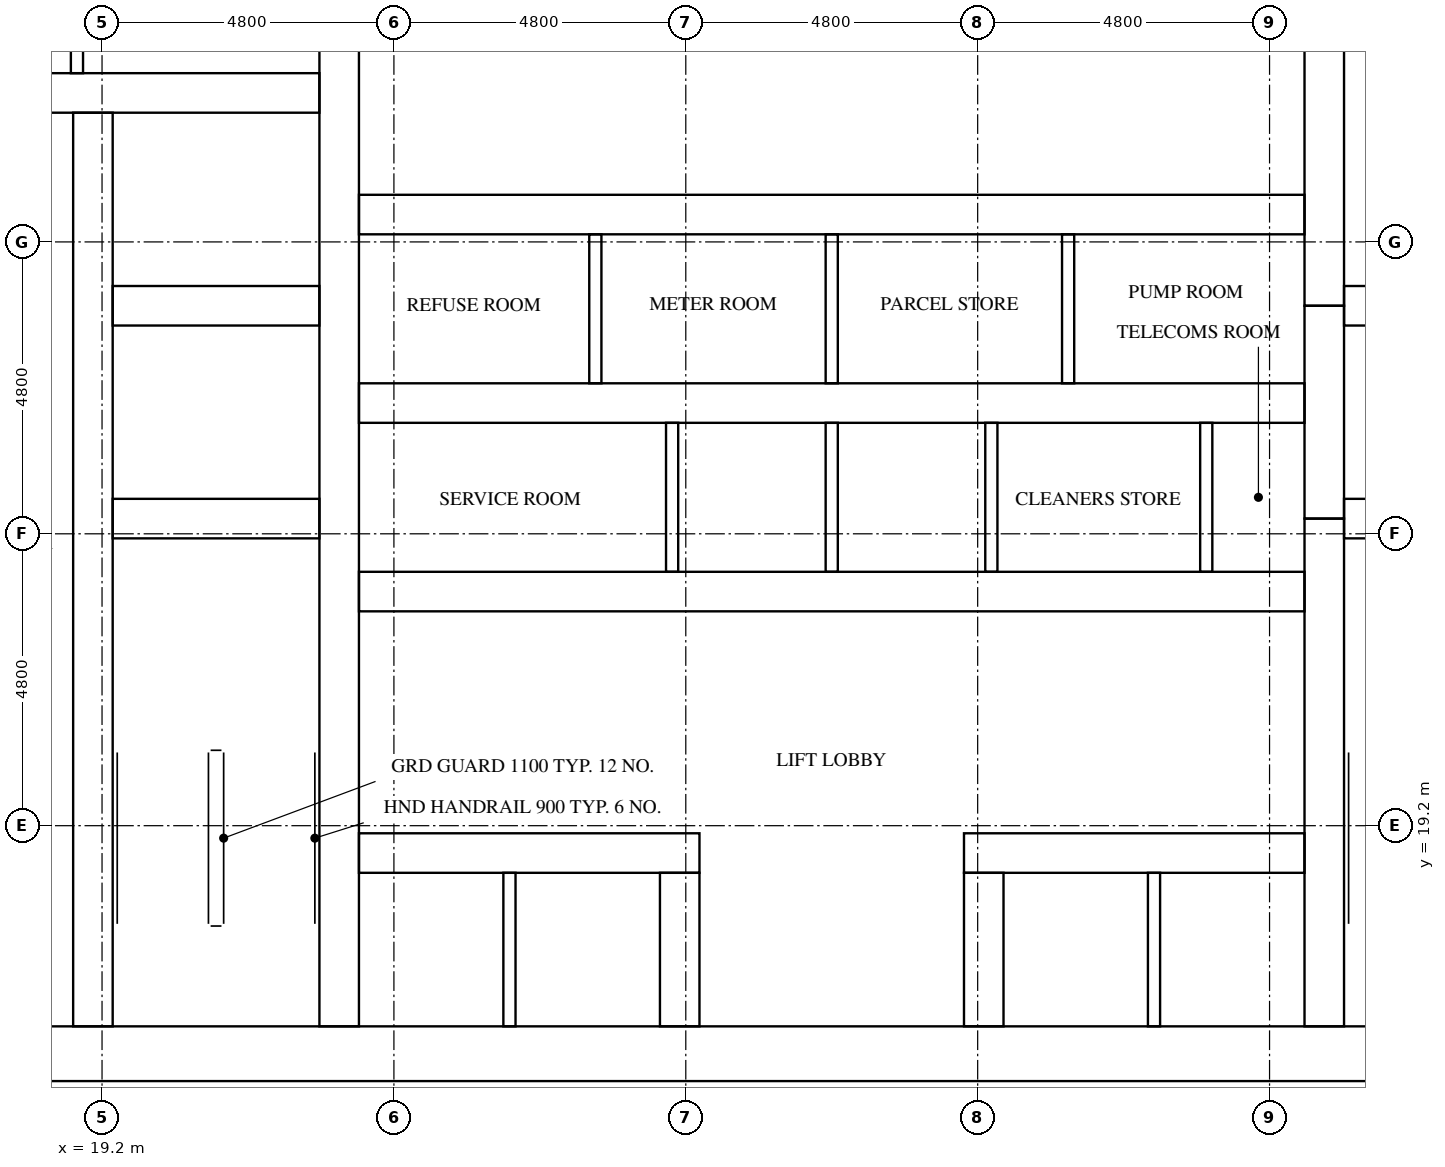
"""IFC4 building model, lengths in metres.
Left out: names, types, materials, properties, quantities, classifications, styles, units other than length and angle.
Written with IfcOpenShell. Run it as: python <this file> out.ifc"""

import sys

from ifc_helpers import new_model, si_unit, direction, frame, frame_2d, origin, place, context, subcontext, project, spatial, rectangle, extrude, element, fill, save


model = new_model("IFC4")
c1 = context("Model", 3, precision=1e-05, world=origin(), true_north=direction((0.0, 1.0)))
c2 = subcontext(c1, "Body", "Model", "MODEL_VIEW")
j1 = project(units=[si_unit("LENGTHUNIT", "METRE"), si_unit("PLANEANGLEUNIT", "RADIAN")], contexts=[c1])
p1 = place(None, origin())
s1 = spatial("IfcSite", under=j1, at=p1, CompositionType="ELEMENT")
p2 = place(p1, origin())
s2 = spatial("IfcBuilding", under=s1, at=p2, CompositionType="ELEMENT")
p3 = place(p2, frame((0.0, 0.0, 92.7)))
s3 = spatial("IfcBuildingStorey", under=s2, at=p3, CompositionType="ELEMENT", Elevation=92.7)
p4 = place(p3, frame((15.0, 15.45, 0.0), z_axis=(0.0, 0.0, 1.0), x_axis=(1.0, 0.0, 0.0)))
e1 = element("IfcWall", 1, at=p4, inside=s3, PredefinedType="SHEAR", context=c2, shape_type="SweptSolid", body=[
    extrude(rectangle(XDim=32.4, YDim=0.9, at=frame_2d((16.2, 0.0))), origin(), (0.0, 0.0, 1.0), 3.2),
])
p5 = place(p4, frame((15.3, 0.0, 0.0)))
e2 = element("IfcOpeningElement", 2, at=p5, cuts=e1, PredefinedType="OPENING", context=c2, shape_type="SweptSolid", body=[
    extrude(rectangle(XDim=1.8, YDim=2.1, at=frame_2d((0.9, 1.05))), frame((0.0, 0.46, 0.0), z_axis=(0.0, -1.0, 0.0), x_axis=(1.0, 0.0, 0.0)), (0.0, 0.0, 1.0), 0.92),
])
p6 = place(p3, frame((19.05, 15.9, 0.0), z_axis=(0.0, 0.0, 1.0), x_axis=(0.0, 1.0, 0.0)))
e3 = element("IfcWall", 3, at=p6, inside=s3, PredefinedType="SHEAR", context=c2, shape_type="SweptSolid", body=[
    extrude(rectangle(XDim=15.025, YDim=0.65, at=frame_2d((7.513, 0.0))), origin(), (0.0, 0.0, 1.0), 3.2),
])
p7 = place(p6, frame((9.55, 0.0, 0.0)))
e4 = element("IfcOpeningElement", 4, at=p7, cuts=e3, PredefinedType="OPENING", context=c2, shape_type="SweptSolid", body=[
    extrude(rectangle(XDim=1.1, YDim=2.1, at=frame_2d((0.55, 1.05))), frame((0.0, 0.335, 0.0), z_axis=(0.0, -1.0, 0.0), x_axis=(1.0, 0.0, 0.0)), (0.0, 0.0, 1.0), 0.67),
])
p8 = place(p6, frame((13.05, 0.0, 0.0)))
e5 = element("IfcOpeningElement", 5, at=p8, cuts=e3, PredefinedType="OPENING", context=c2, shape_type="SweptSolid", body=[
    extrude(rectangle(XDim=1.1, YDim=2.1, at=frame_2d((0.55, 1.05))), frame((0.0, 0.335, 0.0), z_axis=(0.0, -1.0, 0.0), x_axis=(1.0, 0.0, 0.0)), (0.0, 0.0, 1.0), 0.67),
])
p9 = place(p6, frame((0.3, 0.0, 0.0)))
e6 = element("IfcOpeningElement", 6, at=p9, cuts=e3, PredefinedType="OPENING", context=c2, shape_type="SweptSolid", body=[
    extrude(rectangle(XDim=1.2, YDim=2.1, at=frame_2d((0.6, 1.05))), frame((0.0, 0.335, 0.0), z_axis=(0.0, -1.0, 0.0), x_axis=(1.0, 0.0, 0.0)), (0.0, 0.0, 1.0), 0.67),
])
p10 = place(p3, frame((23.1, 15.9, 0.0), z_axis=(0.0, 0.0, 1.0), x_axis=(0.0, 1.0, 0.0)))
e7 = element("IfcWall", 7, at=p10, inside=s3, PredefinedType="SHEAR", context=c2, shape_type="SweptSolid", body=[
    extrude(rectangle(XDim=21.0, YDim=0.65, at=frame_2d((10.5, 0.0))), origin(), (0.0, 0.0, 1.0), 3.2),
])
p11 = place(p3, frame((39.3, 15.9, 0.0), z_axis=(0.0, 0.0, 1.0), x_axis=(0.0, 1.0, 0.0)))
e8 = element("IfcWall", 8, at=p11, inside=s3, PredefinedType="SHEAR", context=c2, shape_type="SweptSolid", body=[
    extrude(rectangle(XDim=8.35, YDim=0.65, at=frame_2d((4.175, 0.0))), origin(), (0.0, 0.0, 1.0), 3.2),
])
p12 = place(p3, frame((39.3, 24.25, 0.0), z_axis=(0.0, 0.0, 1.0), x_axis=(0.0, 1.0, 0.0)))
e9 = element("IfcWall", 9, at=p12, inside=s3, PredefinedType="SHEAR", context=c2, shape_type="SweptSolid", body=[
    extrude(rectangle(XDim=3.5, YDim=0.65, at=frame_2d((1.75, 0.0))), origin(), (0.0, 0.0, 1.0), 3.2),
])
p13 = place(p3, frame((39.3, 27.75, 0.0), z_axis=(0.0, 0.0, 1.0), x_axis=(0.0, 1.0, 0.0)))
e10 = element("IfcWall", 10, at=p13, inside=s3, PredefinedType="SHEAR", context=c2, shape_type="SweptSolid", body=[
    extrude(rectangle(XDim=9.15, YDim=0.65, at=frame_2d((4.575, 0.0))), origin(), (0.0, 0.0, 1.0), 3.2),
])
for number, where, z_axis, x_axis in (
    (11, (19.375, 24.25, 0.0), (0.0, 0.0, 1.0), (1.0, 0.0, 0.0)),
    (12, (19.375, 27.75, 0.0), (0.0, 0.0, 1.0), (1.0, 0.0, 0.0)),
):
    element("IfcWall", number, at=place(p3, frame(where, z_axis=z_axis, x_axis=x_axis)), inside=s3, PredefinedType="SHEAR", context=c2, shape_type="SweptSolid", body=[
        extrude(rectangle(XDim=3.4, YDim=0.65, at=frame_2d((1.7, 0.0))), origin(), (0.0, 0.0, 1.0), 3.2),
    ])
p14 = place(p3, frame((15.9, 31.25, 0.0), z_axis=(0.0, 0.0, 1.0), x_axis=(1.0, 0.0, 0.0)))
e13 = element("IfcWall", 13, at=p14, inside=s3, PredefinedType="SHEAR", context=c2, shape_type="SweptSolid", body=[
    extrude(rectangle(XDim=6.875, YDim=0.65, at=frame_2d((3.438, 0.0))), origin(), (0.0, 0.0, 1.0), 3.2),
])
for number, where, z_axis, x_axis in (
    (14, (39.625, 24.25, 0.0), (0.0, 0.0, 1.0), (1.0, 0.0, 0.0)),
    (15, (39.625, 27.75, 0.0), (0.0, 0.0, 1.0), (1.0, 0.0, 0.0)),
):
    element("IfcWall", number, at=place(p3, frame(where, z_axis=z_axis, x_axis=x_axis)), inside=s3, PredefinedType="SHEAR", context=c2, shape_type="SweptSolid", body=[
        extrude(rectangle(XDim=3.4, YDim=0.65, at=frame_2d((1.7, 0.0))), origin(), (0.0, 0.0, 1.0), 3.2),
    ])
p15 = place(p3, frame((23.425, 18.75, 0.0), z_axis=(0.0, 0.0, 1.0), x_axis=(1.0, 0.0, 0.0)))
e16 = element("IfcWall", 16, at=p15, inside=s3, PredefinedType="SHEAR", context=c2, shape_type="SweptSolid", body=[
    extrude(rectangle(XDim=5.6, YDim=0.65, at=frame_2d((2.8, 0.0))), origin(), (0.0, 0.0, 1.0), 3.2),
])
p16 = place(p15, frame((0.637, 0.0, 0.0)))
e17 = element("IfcOpeningElement", 17, at=p16, cuts=e16, PredefinedType="OPENING", context=c2, shape_type="SweptSolid", body=[
    extrude(rectangle(XDim=1.1, YDim=2.1, at=frame_2d((0.55, 1.05))), frame((0.0, 0.335, 0.0), z_axis=(0.0, -1.0, 0.0), x_axis=(1.0, 0.0, 0.0)), (0.0, 0.0, 1.0), 0.67),
])
p17 = place(p15, frame((3.212, 0.0, 0.0)))
e18 = element("IfcOpeningElement", 18, at=p17, cuts=e16, PredefinedType="OPENING", context=c2, shape_type="SweptSolid", body=[
    extrude(rectangle(XDim=1.1, YDim=2.1, at=frame_2d((0.55, 1.05))), frame((0.0, 0.335, 0.0), z_axis=(0.0, -1.0, 0.0), x_axis=(1.0, 0.0, 0.0)), (0.0, 0.0, 1.0), 0.67),
])
p18 = place(p3, frame((33.375, 18.75, 0.0), z_axis=(0.0, 0.0, 1.0), x_axis=(1.0, 0.0, 0.0)))
e19 = element("IfcWall", 19, at=p18, inside=s3, PredefinedType="SHEAR", context=c2, shape_type="SweptSolid", body=[
    extrude(rectangle(XDim=5.6, YDim=0.65, at=frame_2d((2.8, 0.0))), origin(), (0.0, 0.0, 1.0), 3.2),
])
p19 = place(p18, frame((1.288, 0.0, 0.0)))
e20 = element("IfcOpeningElement", 20, at=p19, cuts=e19, PredefinedType="OPENING", context=c2, shape_type="SweptSolid", body=[
    extrude(rectangle(XDim=1.1, YDim=2.1, at=frame_2d((0.55, 1.05))), frame((0.0, 0.335, 0.0), z_axis=(0.0, -1.0, 0.0), x_axis=(1.0, 0.0, 0.0)), (0.0, 0.0, 1.0), 0.67),
])
p20 = place(p18, frame((3.863, 0.0, 0.0)))
e21 = element("IfcOpeningElement", 21, at=p20, cuts=e19, PredefinedType="OPENING", context=c2, shape_type="SweptSolid", body=[
    extrude(rectangle(XDim=1.1, YDim=2.1, at=frame_2d((0.55, 1.05))), frame((0.0, 0.335, 0.0), z_axis=(0.0, -1.0, 0.0), x_axis=(1.0, 0.0, 0.0)), (0.0, 0.0, 1.0), 0.67),
])
p21 = place(p3, frame((23.425, 23.05, 0.0), z_axis=(0.0, 0.0, 1.0), x_axis=(1.0, 0.0, 0.0)))
e22 = element("IfcWall", 22, at=p21, inside=s3, PredefinedType="SHEAR", context=c2, shape_type="SweptSolid", body=[
    extrude(rectangle(XDim=15.55, YDim=0.65, at=frame_2d((7.775, 0.0))), origin(), (0.0, 0.0, 1.0), 3.2),
])
p22 = place(p21, frame((2.025, 0.0, 0.0)))
e23 = element("IfcOpeningElement", 23, at=p22, cuts=e22, PredefinedType="OPENING", context=c2, shape_type="SweptSolid", body=[
    extrude(rectangle(XDim=1.0, YDim=2.1, at=frame_2d((0.5, 1.05))), frame((0.0, 0.335, 0.0), z_axis=(0.0, -1.0, 0.0), x_axis=(1.0, 0.0, 0.0)), (0.0, 0.0, 1.0), 0.67),
])
p23 = place(p21, frame((11.667, 0.0, 0.0)))
e24 = element("IfcOpeningElement", 24, at=p23, cuts=e22, PredefinedType="OPENING", context=c2, shape_type="SweptSolid", body=[
    extrude(rectangle(XDim=1.0, YDim=2.1, at=frame_2d((0.5, 1.05))), frame((0.0, 0.335, 0.0), z_axis=(0.0, -1.0, 0.0), x_axis=(1.0, 0.0, 0.0)), (0.0, 0.0, 1.0), 0.67),
])
p24 = place(p21, frame((14.292, 0.0, 0.0)))
e25 = element("IfcOpeningElement", 25, at=p24, cuts=e22, PredefinedType="OPENING", context=c2, shape_type="SweptSolid", body=[
    extrude(rectangle(XDim=1.0, YDim=2.1, at=frame_2d((0.5, 1.05))), frame((0.0, 0.335, 0.0), z_axis=(0.0, -1.0, 0.0), x_axis=(1.0, 0.0, 0.0)), (0.0, 0.0, 1.0), 0.67),
])
p25 = place(p3, frame((23.425, 26.15, 0.0), z_axis=(0.0, 0.0, 1.0), x_axis=(1.0, 0.0, 0.0)))
e26 = element("IfcWall", 26, at=p25, inside=s3, PredefinedType="SHEAR", context=c2, shape_type="SweptSolid", body=[
    extrude(rectangle(XDim=15.55, YDim=0.65, at=frame_2d((7.775, 0.0))), origin(), (0.0, 0.0, 1.0), 3.2),
])
p26 = place(p3, frame((23.425, 29.25, 0.0), z_axis=(0.0, 0.0, 1.0), x_axis=(1.0, 0.0, 0.0)))
e27 = element("IfcWall", 27, at=p26, inside=s3, PredefinedType="SHEAR", context=c2, shape_type="SweptSolid", body=[
    extrude(rectangle(XDim=15.55, YDim=0.65, at=frame_2d((7.775, 0.0))), origin(), (0.0, 0.0, 1.0), 3.2),
])
p27 = place(p26, frame((1.394, 0.0, 0.0)))
e28 = element("IfcOpeningElement", 28, at=p27, cuts=e27, PredefinedType="OPENING", context=c2, shape_type="SweptSolid", body=[
    extrude(rectangle(XDim=1.0, YDim=2.1, at=frame_2d((0.5, 1.05))), frame((0.0, 0.335, 0.0), z_axis=(0.0, -1.0, 0.0), x_axis=(1.0, 0.0, 0.0)), (0.0, 0.0, 1.0), 0.67),
])
p28 = place(p26, frame((5.331, 0.0, 0.0)))
e29 = element("IfcOpeningElement", 29, at=p28, cuts=e27, PredefinedType="OPENING", context=c2, shape_type="SweptSolid", body=[
    extrude(rectangle(XDim=1.0, YDim=2.1, at=frame_2d((0.5, 1.05))), frame((0.0, 0.335, 0.0), z_axis=(0.0, -1.0, 0.0), x_axis=(1.0, 0.0, 0.0)), (0.0, 0.0, 1.0), 0.67),
])
p29 = place(p26, frame((9.219, 0.0, 0.0)))
e30 = element("IfcOpeningElement", 30, at=p29, cuts=e27, PredefinedType="OPENING", context=c2, shape_type="SweptSolid", body=[
    extrude(rectangle(XDim=1.0, YDim=2.1, at=frame_2d((0.5, 1.05))), frame((0.0, 0.335, 0.0), z_axis=(0.0, -1.0, 0.0), x_axis=(1.0, 0.0, 0.0)), (0.0, 0.0, 1.0), 0.67),
])
p30 = place(p26, frame((13.156, 0.0, 0.0)))
e31 = element("IfcOpeningElement", 31, at=p30, cuts=e27, PredefinedType="OPENING", context=c2, shape_type="SweptSolid", body=[
    extrude(rectangle(XDim=1.0, YDim=2.1, at=frame_2d((0.5, 1.05))), frame((0.0, 0.335, 0.0), z_axis=(0.0, -1.0, 0.0), x_axis=(1.0, 0.0, 0.0)), (0.0, 0.0, 1.0), 0.67),
])
for number, where, z_axis, x_axis in (
    (32, (28.7, 15.9, 0.0), (0.0, 0.0, 1.0), (0.0, 1.0, 0.0)),
    (33, (33.7, 15.9, 0.0), (0.0, 0.0, 1.0), (0.0, 1.0, 0.0)),
):
    element("IfcWall", number, at=place(p3, frame(where, z_axis=z_axis, x_axis=x_axis)), inside=s3, PredefinedType="SHEAR", context=c2, shape_type="SweptSolid", body=[
        extrude(rectangle(XDim=2.525, YDim=0.65, at=frame_2d((1.263, 0.0))), origin(), (0.0, 0.0, 1.0), 3.2),
    ])
for number, where, z_axis, x_axis in (
    (34, (28.575, 23.375, 0.0), (0.0, 0.0, 1.0), (0.0, 1.0, 0.0)),
    (35, (31.2, 23.375, 0.0), (0.0, 0.0, 1.0), (0.0, 1.0, 0.0)),
    (36, (33.825, 23.375, 0.0), (0.0, 0.0, 1.0), (0.0, 1.0, 0.0)),
):
    element("IfcWall", number, at=place(p3, frame(where, z_axis=z_axis, x_axis=x_axis)), inside=s3, PredefinedType="SOLIDWALL", context=c2, shape_type="SweptSolid", body=[
        extrude(rectangle(XDim=2.45, YDim=0.2, at=frame_2d((1.225, 0.0))), origin(), (0.0, 0.0, 1.0), 3.2),
    ])
for number, where, z_axis, x_axis in (
    (37, (25.9, 15.9, 0.0), (0.0, 0.0, 1.0), (0.0, 1.0, 0.0)),
    (38, (36.5, 15.9, 0.0), (0.0, 0.0, 1.0), (0.0, 1.0, 0.0)),
):
    element("IfcWall", number, at=place(p3, frame(where, z_axis=z_axis, x_axis=x_axis)), inside=s3, PredefinedType="SOLIDWALL", context=c2, shape_type="SweptSolid", body=[
        extrude(rectangle(XDim=2.525, YDim=0.2, at=frame_2d((1.263, 0.0))), origin(), (0.0, 0.0, 1.0), 3.2),
    ])
p31 = place(p3, frame((18.788, 31.575, 0.0), z_axis=(0.0, 0.0, 1.0), x_axis=(0.0, 1.0, 0.0)))
e39 = element("IfcWall", 39, at=p31, inside=s3, PredefinedType="PARTITIONING", context=c2, shape_type="SweptSolid", body=[
    extrude(rectangle(XDim=5.325, YDim=0.2, at=frame_2d((2.663, 0.0))), origin(), (0.0, 0.0, 1.0), 3.2),
])
for number, where, z_axis, x_axis in (
    (40, (37.359, 23.375, 0.0), (0.0, 0.0, 1.0), (0.0, 1.0, 0.0)),
    (41, (27.312, 26.475, 0.0), (0.0, 0.0, 1.0), (0.0, 1.0, 0.0)),
    (42, (31.2, 26.475, 0.0), (0.0, 0.0, 1.0), (0.0, 1.0, 0.0)),
    (43, (35.087, 26.475, 0.0), (0.0, 0.0, 1.0), (0.0, 1.0, 0.0)),
):
    element("IfcWall", number, at=place(p3, frame(where, z_axis=z_axis, x_axis=x_axis)), inside=s3, PredefinedType="PARTITIONING", context=c2, shape_type="SweptSolid", body=[
        extrude(rectangle(XDim=2.45, YDim=0.2, at=frame_2d((1.225, 0.0))), origin(), (0.0, 0.0, 1.0), 3.2),
    ])
p32 = place(p16, origin())
e44 = element("IfcDoor", 44, at=p32, inside=s3, OperationType="DOUBLE_DOOR_SLIDING", PredefinedType="DOOR", context=c2, shape_type="SweptSolid", body=[
    extrude(rectangle(XDim=1.1, YDim=2.1, at=frame_2d((0.55, 1.05))), frame((0.0, 0.025, 0.0), z_axis=(0.0, -1.0, 0.0), x_axis=(1.0, 0.0, 0.0)), (0.0, 0.0, 1.0), 0.05),
])
fill(e17, e44)
p33 = place(p17, origin())
e45 = element("IfcDoor", 45, at=p33, inside=s3, OperationType="DOUBLE_DOOR_SLIDING", PredefinedType="DOOR", context=c2, shape_type="SweptSolid", body=[
    extrude(rectangle(XDim=1.1, YDim=2.1, at=frame_2d((0.55, 1.05))), frame((0.0, 0.025, 0.0), z_axis=(0.0, -1.0, 0.0), x_axis=(1.0, 0.0, 0.0)), (0.0, 0.0, 1.0), 0.05),
])
fill(e18, e45)
p34 = place(p19, origin())
e46 = element("IfcDoor", 46, at=p34, inside=s3, OperationType="DOUBLE_DOOR_SLIDING", PredefinedType="DOOR", context=c2, shape_type="SweptSolid", body=[
    extrude(rectangle(XDim=1.1, YDim=2.1, at=frame_2d((0.55, 1.05))), frame((0.0, 0.025, 0.0), z_axis=(0.0, -1.0, 0.0), x_axis=(1.0, 0.0, 0.0)), (0.0, 0.0, 1.0), 0.05),
])
fill(e20, e46)
p35 = place(p20, origin())
e47 = element("IfcDoor", 47, at=p35, inside=s3, OperationType="DOUBLE_DOOR_SLIDING", PredefinedType="DOOR", context=c2, shape_type="SweptSolid", body=[
    extrude(rectangle(XDim=1.1, YDim=2.1, at=frame_2d((0.55, 1.05))), frame((0.0, 0.025, 0.0), z_axis=(0.0, -1.0, 0.0), x_axis=(1.0, 0.0, 0.0)), (0.0, 0.0, 1.0), 0.05),
])
fill(e21, e47)
p36 = place(p7, origin())
e48 = element("IfcDoor", 48, at=p36, inside=s3, OperationType="DOUBLE_DOOR_SLIDING", PredefinedType="DOOR", context=c2, shape_type="SweptSolid", body=[
    extrude(rectangle(XDim=1.1, YDim=2.1, at=frame_2d((0.55, 1.05))), frame((0.0, 0.025, 0.0), z_axis=(0.0, -1.0, 0.0), x_axis=(1.0, 0.0, 0.0)), (0.0, 0.0, 1.0), 0.05),
])
fill(e4, e48)
p37 = place(p8, origin())
e49 = element("IfcDoor", 49, at=p37, inside=s3, OperationType="DOUBLE_DOOR_SLIDING", PredefinedType="DOOR", context=c2, shape_type="SweptSolid", body=[
    extrude(rectangle(XDim=1.1, YDim=2.1, at=frame_2d((0.55, 1.05))), frame((0.0, 0.025, 0.0), z_axis=(0.0, -1.0, 0.0), x_axis=(1.0, 0.0, 0.0)), (0.0, 0.0, 1.0), 0.05),
])
fill(e5, e49)
p38 = place(p9, frame((1.2, 0.0, 0.0), z_axis=(0.0, 0.0, 1.0), x_axis=(-1.0, 0.0, 0.0)))
e50 = element("IfcDoor", 50, at=p38, inside=s3, OperationType="SINGLE_SWING_LEFT", PredefinedType="DOOR", context=c2, shape_type="SweptSolid", body=[
    extrude(rectangle(XDim=1.2, YDim=2.1, at=frame_2d((0.6, 1.05))), frame((0.0, 0.025, 0.0), z_axis=(0.0, -1.0, 0.0), x_axis=(1.0, 0.0, 0.0)), (0.0, 0.0, 1.0), 0.05),
])
fill(e6, e50)
p39 = place(p5, frame((1.8, 0.0, 0.0), z_axis=(0.0, 0.0, 1.0), x_axis=(-1.0, 0.0, 0.0)))
e51 = element("IfcDoor", 51, at=p39, inside=s3, OperationType="DOUBLE_DOOR_SINGLE_SWING", PredefinedType="DOOR", context=c2, shape_type="SweptSolid", body=[
    extrude(rectangle(XDim=1.8, YDim=2.1, at=frame_2d((0.9, 1.05))), frame((0.0, 0.025, 0.0), z_axis=(0.0, -1.0, 0.0), x_axis=(1.0, 0.0, 0.0)), (0.0, 0.0, 1.0), 0.05),
])
fill(e2, e51)
p40 = place(p22, frame((1.0, 0.0, 0.0), z_axis=(0.0, 0.0, 1.0), x_axis=(-1.0, 0.0, 0.0)))
e52 = element("IfcDoor", 52, at=p40, inside=s3, OperationType="SINGLE_SWING_RIGHT", PredefinedType="DOOR", context=c2, shape_type="SweptSolid", body=[
    extrude(rectangle(XDim=1.0, YDim=2.1, at=frame_2d((0.5, 1.05))), frame((0.0, 0.025, 0.0), z_axis=(0.0, -1.0, 0.0), x_axis=(1.0, 0.0, 0.0)), (0.0, 0.0, 1.0), 0.05),
])
fill(e23, e52)
p41 = place(p23, frame((1.0, 0.0, 0.0), z_axis=(0.0, 0.0, 1.0), x_axis=(-1.0, 0.0, 0.0)))
e53 = element("IfcDoor", 53, at=p41, inside=s3, OperationType="SINGLE_SWING_LEFT", PredefinedType="DOOR", context=c2, shape_type="SweptSolid", body=[
    extrude(rectangle(XDim=1.0, YDim=2.1, at=frame_2d((0.5, 1.05))), frame((0.0, 0.025, 0.0), z_axis=(0.0, -1.0, 0.0), x_axis=(1.0, 0.0, 0.0)), (0.0, 0.0, 1.0), 0.05),
])
fill(e24, e53)
p42 = place(p24, frame((1.0, 0.0, 0.0), z_axis=(0.0, 0.0, 1.0), x_axis=(-1.0, 0.0, 0.0)))
e54 = element("IfcDoor", 54, at=p42, inside=s3, OperationType="SINGLE_SWING_RIGHT", PredefinedType="DOOR", context=c2, shape_type="SweptSolid", body=[
    extrude(rectangle(XDim=1.0, YDim=2.1, at=frame_2d((0.5, 1.05))), frame((0.0, 0.025, 0.0), z_axis=(0.0, -1.0, 0.0), x_axis=(1.0, 0.0, 0.0)), (0.0, 0.0, 1.0), 0.05),
])
fill(e25, e54)
p43 = place(p27, origin())
e55 = element("IfcDoor", 55, at=p43, inside=s3, OperationType="SINGLE_SWING_LEFT", PredefinedType="DOOR", context=c2, shape_type="SweptSolid", body=[
    extrude(rectangle(XDim=1.0, YDim=2.1, at=frame_2d((0.5, 1.05))), frame((0.0, 0.025, 0.0), z_axis=(0.0, -1.0, 0.0), x_axis=(1.0, 0.0, 0.0)), (0.0, 0.0, 1.0), 0.05),
])
fill(e28, e55)
p44 = place(p28, origin())
e56 = element("IfcDoor", 56, at=p44, inside=s3, OperationType="SINGLE_SWING_RIGHT", PredefinedType="DOOR", context=c2, shape_type="SweptSolid", body=[
    extrude(rectangle(XDim=1.0, YDim=2.1, at=frame_2d((0.5, 1.05))), frame((0.0, 0.025, 0.0), z_axis=(0.0, -1.0, 0.0), x_axis=(1.0, 0.0, 0.0)), (0.0, 0.0, 1.0), 0.05),
])
fill(e29, e56)
p45 = place(p29, origin())
e57 = element("IfcDoor", 57, at=p45, inside=s3, OperationType="SINGLE_SWING_LEFT", PredefinedType="DOOR", context=c2, shape_type="SweptSolid", body=[
    extrude(rectangle(XDim=1.0, YDim=2.1, at=frame_2d((0.5, 1.05))), frame((0.0, 0.025, 0.0), z_axis=(0.0, -1.0, 0.0), x_axis=(1.0, 0.0, 0.0)), (0.0, 0.0, 1.0), 0.05),
])
fill(e30, e57)
p46 = place(p30, origin())
e58 = element("IfcDoor", 58, at=p46, inside=s3, OperationType="SINGLE_SWING_RIGHT", PredefinedType="DOOR", context=c2, shape_type="SweptSolid", body=[
    extrude(rectangle(XDim=1.0, YDim=2.1, at=frame_2d((0.5, 1.05))), frame((0.0, 0.025, 0.0), z_axis=(0.0, -1.0, 0.0), x_axis=(1.0, 0.0, 0.0)), (0.0, 0.0, 1.0), 0.05),
])
fill(e31, e58)
save(model, sys.argv[1])
